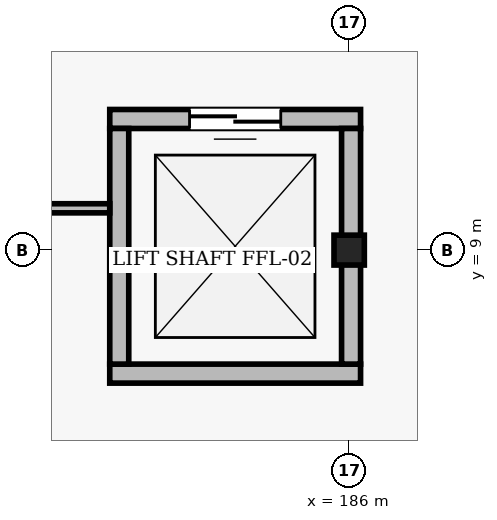
"""IFC4 building model, lengths in metres.
Left out: names, types, materials, properties, quantities, classifications, styles, units other than length and angle.
Written with IfcOpenShell. Run it as: python <this file> out.ifc"""

import sys

from ifc_helpers import new_model, si_unit, direction, frame, frame_2d, origin, origin_2d, place, context, subcontext, project, spatial, rectangle, i_section, extrude, element, fill, save


model = new_model("IFC4")
c1 = context("Model", 3, precision=1e-05, world=origin(), true_north=direction((0.0, 1.0)))
c2 = subcontext(c1, "Body", "Model", "MODEL_VIEW")
j1 = project(units=[si_unit("LENGTHUNIT", "METRE"), si_unit("PLANEANGLEUNIT", "RADIAN")], contexts=[c1])
p1 = place(None, origin())
s1 = spatial("IfcSite", under=j1, at=p1, CompositionType="ELEMENT")
p2 = place(p1, origin())
s2 = spatial("IfcBuilding", under=s1, at=p2, CompositionType="ELEMENT")
p3 = place(p2, frame((0.0, 0.0, -5.4)))
s3 = spatial("IfcBuildingStorey", under=s2, at=p3, CompositionType="ELEMENT", Elevation=-5.4)
p4 = place(p3, frame((186.0, 9.0, 0.0), z_axis=(0.0, 0.0, 1.0), x_axis=(1.0, 0.0, 0.0)))
e1 = element("IfcColumn", 1, at=p4, inside=s3, PredefinedType="COLUMN", context=c2, shape_type="SweptSolid", body=[
    extrude(i_section(OverallWidth=0.399, OverallDepth=0.393, WebThickness=0.023, FlangeThickness=0.037, FilletRadius=0.018, at=origin_2d()), origin(), (0.0, 0.0, 1.0), 5.4),
])
p5 = place(p3, frame((182.85, 7.375, 0.0), z_axis=(0.0, 0.0, 1.0), x_axis=(1.0, 0.0, 0.0)))
e2 = element("IfcWall", 2, at=p5, inside=s3, PredefinedType="SOLIDWALL", context=c2, shape_type="SweptSolid", body=[
    extrude(rectangle(XDim=3.3, YDim=0.25, at=frame_2d((1.65, 0.0))), origin(), (0.0, 0.0, 1.0), 5.1),
])
p6 = place(p3, frame((186.15, 10.725, 0.0), z_axis=(0.0, 0.0, 1.0), x_axis=(-1.0, 0.0, 0.0)))
e3 = element("IfcWall", 3, at=p6, inside=s3, PredefinedType="SOLIDWALL", context=c2, shape_type="SweptSolid", body=[
    extrude(rectangle(XDim=3.3, YDim=0.25, at=frame_2d((1.65, 0.0))), origin(), (0.0, 0.0, 1.0), 5.1),
])
p7 = place(p6, frame((1.05, 0.0, 0.0)))
e4 = element("IfcOpeningElement", 4, at=p7, cuts=e3, PredefinedType="OPENING", context=c2, shape_type="SweptSolid", body=[
    extrude(rectangle(XDim=1.2, YDim=2.25, at=frame_2d((0.6, 1.125))), frame((0.0, 0.135, 0.0), z_axis=(0.0, -1.0, 0.0), x_axis=(1.0, 0.0, 0.0)), (0.0, 0.0, 1.0), 0.27),
])
for number, where, z_axis, x_axis in (
    (5, (182.975, 10.6, 0.0), (0.0, 0.0, 1.0), (0.0, -1.0, 0.0)),
    (6, (186.025, 7.5, 0.0), (0.0, 0.0, 1.0), (0.0, 1.0, 0.0)),
):
    element("IfcWall", number, at=place(p3, frame(where, z_axis=z_axis, x_axis=x_axis)), inside=s3, PredefinedType="SOLIDWALL", context=c2, shape_type="SweptSolid", body=[
        extrude(rectangle(XDim=3.1, YDim=0.25, at=frame_2d((1.55, 0.0))), origin(), (0.0, 0.0, 1.0), 5.1),
    ])
p8 = place(p3, frame((182.85, 9.55, 0.0), z_axis=(0.0, 0.0, 1.0), x_axis=(-1.0, 0.0, 0.0)))
e7 = element("IfcWall", 7, at=p8, inside=s3, PredefinedType="PARTITIONING", context=c2, shape_type="SweptSolid", body=[
    extrude(rectangle(XDim=4.55, YDim=0.12, at=frame_2d((2.275, 0.0))), origin(), (0.0, 0.0, 1.0), 4.332),
])
p9 = place(p7, origin())
e8 = element("IfcDoor", 8, at=p9, inside=s3, OperationType="DOUBLE_DOOR_SLIDING", PredefinedType="DOOR", context=c2, shape_type="SweptSolid", body=[
    extrude(rectangle(XDim=1.2, YDim=2.25, at=frame_2d((0.6, 1.125))), frame((0.0, 0.025, 0.0), z_axis=(0.0, -1.0, 0.0), x_axis=(1.0, 0.0, 0.0)), (0.0, 0.0, 1.0), 0.05),
])
fill(e4, e8)
save(model, sys.argv[1])
